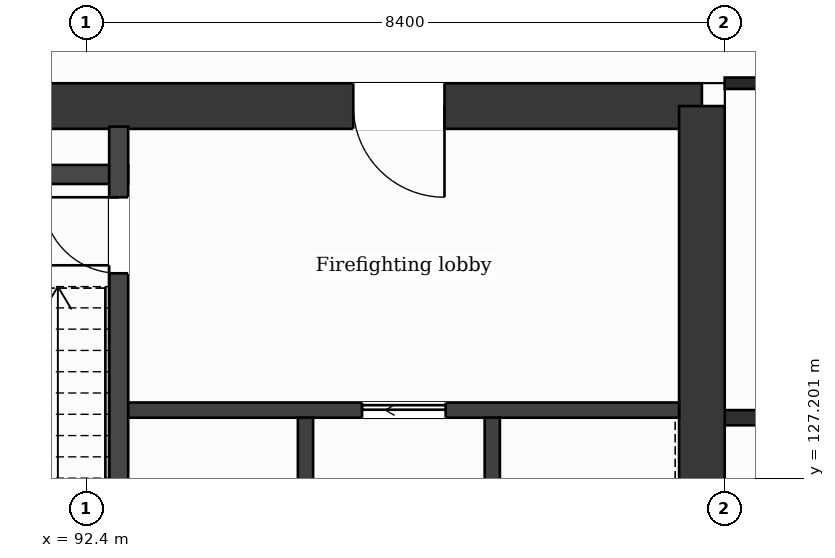
"""IFC4 building model, lengths in metres.
Left out: names, types, materials, properties, quantities, classifications, styles, units other than length and angle.
Written with IfcOpenShell. Run it as: python <this file> out.ifc"""

import sys

from ifc_helpers import new_model, si_unit, direction, frame, frame_2d, origin, place, context, subcontext, project, spatial, rectangle, extrude, element, fill, save


model = new_model("IFC4")
c1 = context("Model", 3, precision=1e-05, world=origin(), true_north=direction((0.0, 1.0)))
c2 = subcontext(c1, "Body", "Model", "MODEL_VIEW")
j1 = project(units=[si_unit("LENGTHUNIT", "METRE"), si_unit("PLANEANGLEUNIT", "RADIAN")], contexts=[c1])
p1 = place(None, origin())
s1 = spatial("IfcSite", under=j1, at=p1, CompositionType="ELEMENT")
p2 = place(p1, origin())
s2 = spatial("IfcBuilding", under=s1, at=p2, CompositionType="ELEMENT")
p3 = place(p2, frame((0.0, 0.0, 315.4)))
s3 = spatial("IfcBuildingStorey", under=s2, at=p3, CompositionType="ELEMENT", Elevation=315.4)
p4 = place(p3, frame((88.893, 132.1, 0.0), z_axis=(0.0, 0.0, 1.0), x_axis=(1.0, 0.0, 0.0)))
e1 = element("IfcWall", 1, at=p4, inside=s3, PredefinedType="SHEAR", context=c2, shape_type="SweptSolid", body=[
    extrude(rectangle(XDim=11.607, YDim=0.6, at=frame_2d((5.803, 0.0))), origin(), (0.0, 0.0, 1.0), 4.5),
])
p5 = place(p4, frame((7.021, 0.0, 0.0)))
e2 = element("IfcOpeningElement", 2, at=p5, cuts=e1, PredefinedType="OPENING", context=c2, shape_type="SweptSolid", body=[
    extrude(rectangle(XDim=1.2, YDim=2.1, at=frame_2d((0.6, 1.05))), frame((0.0, 0.31, 0.0), z_axis=(0.0, -1.0, 0.0), x_axis=(1.0, 0.0, 0.0)), (0.0, 0.0, 1.0), 0.62),
])
p6 = place(p3, frame((100.5, 132.1, 0.0), z_axis=(0.0, 0.0, 1.0), x_axis=(0.0, -1.0, 0.0)))
e3 = element("IfcWall", 3, at=p6, inside=s3, PredefinedType="SHEAR", context=c2, shape_type="SweptSolid", body=[
    extrude(rectangle(XDim=15.8, YDim=0.6, at=frame_2d((7.9, 0.0))), origin(), (0.0, 0.0, 1.0), 4.5),
])
p7 = place(p6, frame((7.95, 0.0, 0.0)))
e4 = element("IfcOpeningElement", 4, at=p7, cuts=e3, PredefinedType="OPENING", context=c2, shape_type="SweptSolid", body=[
    extrude(rectangle(XDim=1.4, YDim=2.1, at=frame_2d((0.7, 1.05))), frame((0.0, 0.31, 0.0), z_axis=(0.0, -1.0, 0.0), x_axis=(1.0, 0.0, 0.0)), (0.0, 0.0, 1.0), 0.62),
])
p8 = place(p3, frame((100.8, 128.0, 0.0), z_axis=(0.0, 0.0, 1.0), x_axis=(1.0, 0.0, 0.0)))
e5 = element("IfcWall", 5, at=p8, inside=s3, PredefinedType="PARTITIONING", context=c2, shape_type="SweptSolid", body=[
    extrude(rectangle(XDim=21.0, YDim=0.2, at=frame_2d((10.5, 0.0))), origin(), (0.0, 0.0, 1.0), 4.05),
])
p9 = place(p3, frame((92.827, 128.1, 0.0), z_axis=(0.0, 0.0, 1.0), x_axis=(1.0, 0.0, 0.0)))
e6 = element("IfcWall", 6, at=p9, inside=s3, PredefinedType="PARTITIONING", context=c2, shape_type="SweptSolid", body=[
    extrude(rectangle(XDim=7.373, YDim=0.2, at=frame_2d((3.687, 0.0))), origin(), (0.0, 0.0, 1.0), 4.05),
])
p10 = place(p9, frame((3.202, 0.0, 0.0)))
e7 = element("IfcOpeningElement", 7, at=p10, cuts=e6, PredefinedType="OPENING", context=c2, shape_type="SweptSolid", body=[
    extrude(rectangle(XDim=1.1, YDim=2.1, at=frame_2d((0.55, 1.05))), frame((0.0, 0.11, 0.0), z_axis=(0.0, -1.0, 0.0), x_axis=(1.0, 0.0, 0.0)), (0.0, 0.0, 1.0), 0.22),
])
p11 = place(p3, frame((89.045, 131.2, 0.0), z_axis=(0.0, 0.0, 1.0), x_axis=(1.0, 0.0, 0.0)))
e8 = element("IfcWall", 8, at=p11, inside=s3, PredefinedType="PARTITIONING", context=c2, shape_type="SweptSolid", body=[
    extrude(rectangle(XDim=3.907, YDim=0.25, at=frame_2d((1.954, 0.0))), origin(), (0.0, 0.0, 1.0), 4.05),
])
p12 = place(p3, frame((100.8, 132.4, 0.0), z_axis=(0.0, 0.0, 1.0), x_axis=(1.0, 0.0, 0.0)))
e9 = element("IfcWall", 9, at=p12, inside=s3, PredefinedType="PARTITIONING", context=c2, shape_type="SweptSolid", body=[
    extrude(rectangle(XDim=21.0, YDim=0.15, at=frame_2d((10.5, 0.0))), origin(), (0.0, 0.0, 1.0), 4.05),
])
p13 = place(p12, frame((3.5, 0.0, 0.0)))
e10 = element("IfcOpeningElement", 10, at=p13, cuts=e9, PredefinedType="OPENING", context=c2, shape_type="SweptSolid", body=[
    extrude(rectangle(XDim=1.2, YDim=2.1, at=frame_2d((0.6, 1.05))), frame((0.0, 0.085, 0.0), z_axis=(0.0, -1.0, 0.0), x_axis=(1.0, 0.0, 0.0)), (0.0, 0.0, 1.0), 0.17),
])
p14 = place(p12, frame((9.7, 0.0, 0.0)))
e11 = element("IfcOpeningElement", 11, at=p14, cuts=e9, PredefinedType="OPENING", context=c2, shape_type="SweptSolid", body=[
    extrude(rectangle(XDim=1.0, YDim=2.1, at=frame_2d((0.5, 1.05))), frame((0.0, 0.085, 0.0), z_axis=(0.0, -1.0, 0.0), x_axis=(1.0, 0.0, 0.0)), (0.0, 0.0, 1.0), 0.17),
])
p15 = place(p12, frame((13.7, 0.0, 0.0)))
e12 = element("IfcOpeningElement", 12, at=p15, cuts=e9, PredefinedType="OPENING", context=c2, shape_type="SweptSolid", body=[
    extrude(rectangle(XDim=1.0, YDim=2.1, at=frame_2d((0.5, 1.05))), frame((0.0, 0.085, 0.0), z_axis=(0.0, -1.0, 0.0), x_axis=(1.0, 0.0, 0.0)), (0.0, 0.0, 1.0), 0.17),
])
p16 = place(p12, frame((18.1, 0.0, 0.0)))
e13 = element("IfcOpeningElement", 13, at=p16, cuts=e9, PredefinedType="OPENING", context=c2, shape_type="SweptSolid", body=[
    extrude(rectangle(XDim=1.0, YDim=2.1, at=frame_2d((0.5, 1.05))), frame((0.0, 0.085, 0.0), z_axis=(0.0, -1.0, 0.0), x_axis=(1.0, 0.0, 0.0)), (0.0, 0.0, 1.0), 0.17),
])
p17 = place(p3, frame((92.827, 124.575, 0.0), z_axis=(0.0, 0.0, 1.0), x_axis=(0.0, 1.0, 0.0)))
e14 = element("IfcWall", 14, at=p17, inside=s3, PredefinedType="PARTITIONING", context=c2, shape_type="SweptSolid", body=[
    extrude(rectangle(XDim=7.255, YDim=0.25, at=frame_2d((3.627, 0.0))), origin(), (0.0, 0.0, 1.0), 4.05),
])
p18 = place(p17, frame((5.325, 0.0, 0.0)))
e15 = element("IfcOpeningElement", 15, at=p18, cuts=e14, PredefinedType="OPENING", context=c2, shape_type="SweptSolid", body=[
    extrude(rectangle(XDim=1.0, YDim=2.1, at=frame_2d((0.5, 1.05))), frame((0.0, 0.135, 0.0), z_axis=(0.0, -1.0, 0.0), x_axis=(1.0, 0.0, 0.0)), (0.0, 0.0, 1.0), 0.27),
])
for number, where, z_axis, x_axis in (
    (16, (95.285, 124.9, 0.0), (0.0, 0.0, 1.0), (0.0, 1.0, 0.0)),
    (17, (97.742, 124.9, 0.0), (0.0, 0.0, 1.0), (0.0, 1.0, 0.0)),
):
    element("IfcWall", number, at=place(p3, frame(where, z_axis=z_axis, x_axis=x_axis)), inside=s3, PredefinedType="PARTITIONING", context=c2, shape_type="SweptSolid", body=[
        extrude(rectangle(XDim=3.1, YDim=0.2, at=frame_2d((1.55, 0.0))), origin(), (0.0, 0.0, 1.0), 4.05),
    ])
p19 = place(p10, origin())
e18 = element("IfcDoor", 18, at=p19, inside=s3, OperationType="SLIDING_TO_LEFT", PredefinedType="DOOR", context=c2, shape_type="SweptSolid", body=[
    extrude(rectangle(XDim=1.1, YDim=2.1, at=frame_2d((0.55, 1.05))), frame((0.0, 0.025, 0.0), z_axis=(0.0, -1.0, 0.0), x_axis=(1.0, 0.0, 0.0)), (0.0, 0.0, 1.0), 0.05),
])
fill(e7, e18)
p20 = place(p18, origin())
e19 = element("IfcDoor", 19, at=p20, inside=s3, OperationType="SINGLE_SWING_RIGHT", PredefinedType="DOOR", context=c2, shape_type="SweptSolid", body=[
    extrude(rectangle(XDim=1.0, YDim=2.1, at=frame_2d((0.5, 1.05))), frame((0.0, 0.025, 0.0), z_axis=(0.0, -1.0, 0.0), x_axis=(1.0, 0.0, 0.0)), (0.0, 0.0, 1.0), 0.05),
])
fill(e15, e19)
p21 = place(p5, origin())
e20 = element("IfcDoor", 20, at=p21, inside=s3, OperationType="SINGLE_SWING_RIGHT", PredefinedType="DOOR", context=c2, shape_type="SweptSolid", body=[
    extrude(rectangle(XDim=1.2, YDim=2.1, at=frame_2d((0.6, 1.05))), frame((0.0, 0.025, 0.0), z_axis=(0.0, -1.0, 0.0), x_axis=(1.0, 0.0, 0.0)), (0.0, 0.0, 1.0), 0.05),
])
fill(e2, e20)
save(model, sys.argv[1])
